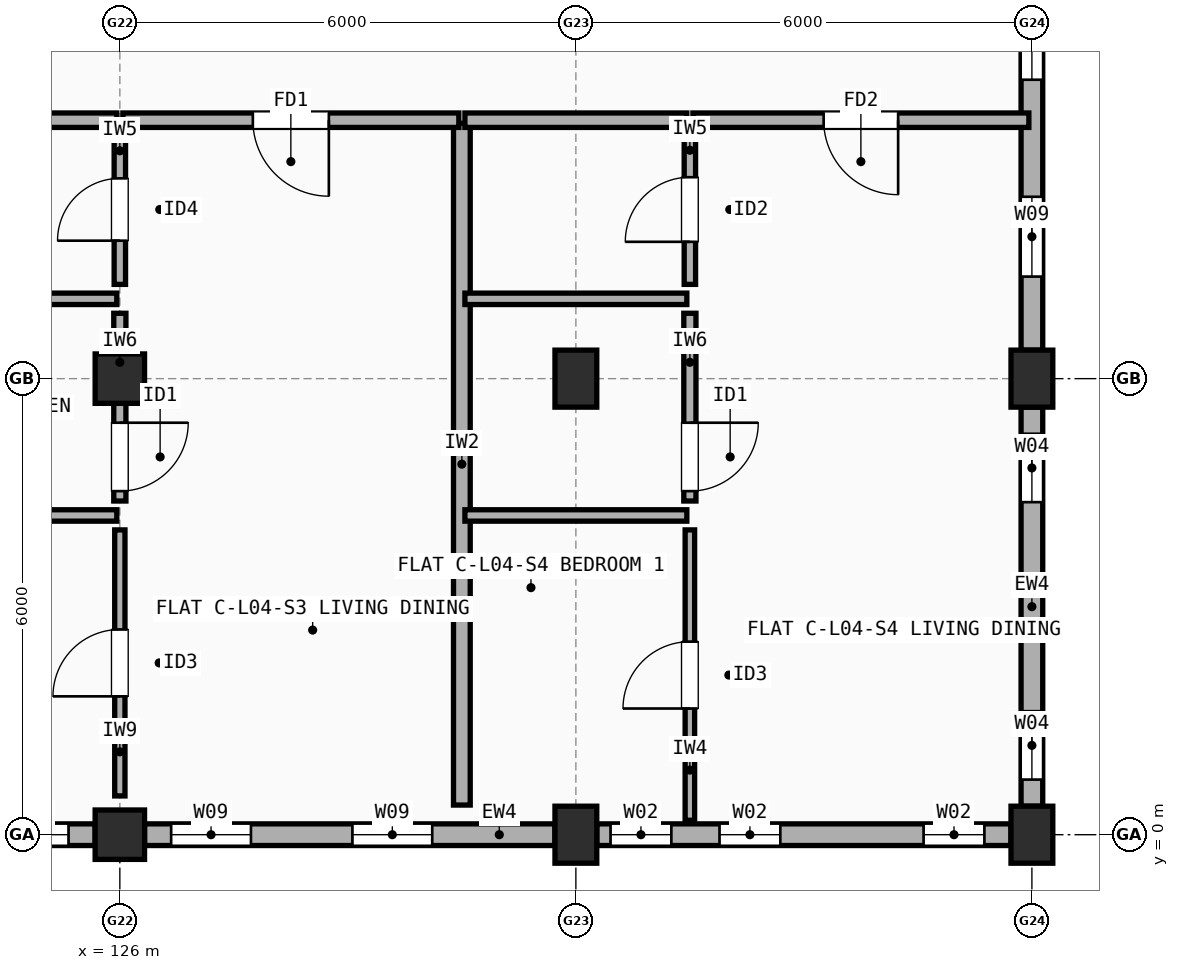
"""IFC4 building model, lengths in metres.
Left out: names, types, materials, properties, quantities, classifications, styles, units other than length and angle.
Written with IfcOpenShell. Run it as: python <this file> out.ifc"""

import sys

from ifc_helpers import new_model, si_unit, direction, frame, frame_2d, origin, origin_2d, place, context, subcontext, project, spatial, rectangle, extrude, element, fill, save


model = new_model("IFC4")
c1 = context("Model", 3, precision=1e-05, world=origin(), true_north=direction((0.0, 1.0)))
c2 = subcontext(c1, "Body", "Model", "MODEL_VIEW")
j1 = project(units=[si_unit("LENGTHUNIT", "METRE"), si_unit("PLANEANGLEUNIT", "RADIAN")], contexts=[c1])
p1 = place(None, origin())
s1 = spatial("IfcSite", under=j1, at=p1, CompositionType="ELEMENT")
p2 = place(p1, origin())
s2 = spatial("IfcBuilding", under=s1, at=p2, CompositionType="ELEMENT")
p3 = place(p2, frame((0.0, 0.0, 14.1)))
s3 = spatial("IfcBuildingStorey", under=s2, at=p3, CompositionType="ELEMENT", Elevation=14.1)
for number, where, z_axis, x_axis in (
    (1, (126.0, 0.0, 0.0), (0.0, 0.0, 1.0), (1.0, 0.0, 0.0)),
    (2, (126.0, 6.0, 0.0), (0.0, 0.0, 1.0), (1.0, 0.0, 0.0)),
):
    element("IfcColumn", number, at=place(p3, frame(where, z_axis=z_axis, x_axis=x_axis)), inside=s3, PredefinedType="COLUMN", context=c2, shape_type="SweptSolid", body=[
        extrude(rectangle(XDim=0.65, YDim=0.65, at=origin_2d()), origin(), (0.0, 0.0, 1.0), 2.95),
    ])
for number, where, z_axis, x_axis in (
    (3, (132.0, 0.0, 0.0), (0.0, 0.0, 1.0), (1.0, 0.0, 0.0)),
    (4, (132.0, 6.0, 0.0), (0.0, 0.0, 1.0), (1.0, 0.0, 0.0)),
    (5, (138.0, 0.0, 0.0), (0.0, 0.0, 1.0), (1.0, 0.0, 0.0)),
    (6, (138.0, 6.0, 0.0), (0.0, 0.0, 1.0), (1.0, 0.0, 0.0)),
):
    element("IfcColumn", number, at=place(p3, frame(where, z_axis=z_axis, x_axis=x_axis)), inside=s3, PredefinedType="COLUMN", context=c2, shape_type="SweptSolid", body=[
        extrude(rectangle(XDim=0.55, YDim=0.75, at=origin_2d()), origin(), (0.0, 0.0, 1.0), 2.95),
    ])
p4 = place(p3, frame((120.325, 0.0, 0.0), z_axis=(0.0, 0.0, 1.0), x_axis=(1.0, 0.0, 0.0)))
e7 = element("IfcWall", 7, at=p4, inside=s3, PredefinedType="STANDARD", context=c2, shape_type="SweptSolid", body=[
    extrude(rectangle(XDim=5.35, YDim=0.285, at=frame_2d((2.675, 0.0))), origin(), (0.0, 0.0, 1.0), 2.432),
])
p5 = place(p4, frame((1.565, 0.0, 0.9)))
e8 = element("IfcOpeningElement", 8, at=p5, cuts=e7, PredefinedType="OPENING", context=c2, shape_type="SweptSolid", body=[
    extrude(rectangle(XDim=0.9, YDim=1.3, at=frame_2d((0.45, 0.65))), frame((0.0, 0.152, 0.0), z_axis=(0.0, -1.0, 0.0), x_axis=(1.0, 0.0, 0.0)), (0.0, 0.0, 1.0), 0.305),
])
p6 = place(p4, frame((4.1, 0.0, 0.9)))
e9 = element("IfcOpeningElement", 9, at=p6, cuts=e7, PredefinedType="OPENING", context=c2, shape_type="SweptSolid", body=[
    extrude(rectangle(XDim=0.9, YDim=1.3, at=frame_2d((0.45, 0.65))), frame((0.0, 0.152, 0.0), z_axis=(0.0, -1.0, 0.0), x_axis=(1.0, 0.0, 0.0)), (0.0, 0.0, 1.0), 0.305),
])
p7 = place(p3, frame((126.325, 0.0, 0.0), z_axis=(0.0, 0.0, 1.0), x_axis=(1.0, 0.0, 0.0)))
e10 = element("IfcWall", 10, at=p7, inside=s3, PredefinedType="STANDARD", context=c2, shape_type="SweptSolid", body=[
    extrude(rectangle(XDim=5.4, YDim=0.285, at=frame_2d((2.7, 0.0))), origin(), (0.0, 0.0, 1.0), 2.432),
])
p8 = place(p7, frame((0.35, 0.0, 0.9)))
e11 = element("IfcOpeningElement", 11, at=p8, cuts=e10, PredefinedType="OPENING", context=c2, shape_type="SweptSolid", body=[
    extrude(rectangle(XDim=1.05, YDim=1.35, at=frame_2d((0.525, 0.675))), frame((0.0, 0.152, 0.0), z_axis=(0.0, -1.0, 0.0), x_axis=(1.0, 0.0, 0.0)), (0.0, 0.0, 1.0), 0.305),
])
p9 = place(p7, frame((2.735, 0.0, 0.9)))
e12 = element("IfcOpeningElement", 12, at=p9, cuts=e10, PredefinedType="OPENING", context=c2, shape_type="SweptSolid", body=[
    extrude(rectangle(XDim=1.05, YDim=1.35, at=frame_2d((0.525, 0.675))), frame((0.0, 0.152, 0.0), z_axis=(0.0, -1.0, 0.0), x_axis=(1.0, 0.0, 0.0)), (0.0, 0.0, 1.0), 0.305),
])
p10 = place(p3, frame((132.275, 0.0, 0.0), z_axis=(0.0, 0.0, 1.0), x_axis=(1.0, 0.0, 0.0)))
e13 = element("IfcWall", 13, at=p10, inside=s3, PredefinedType="STANDARD", context=c2, shape_type="SweptSolid", body=[
    extrude(rectangle(XDim=5.45, YDim=0.285, at=frame_2d((2.725, 0.0))), origin(), (0.0, 0.0, 1.0), 2.432),
])
p11 = place(p10, frame((1.615, 0.0, 0.9)))
e14 = element("IfcOpeningElement", 14, at=p11, cuts=e13, PredefinedType="OPENING", context=c2, shape_type="SweptSolid", body=[
    extrude(rectangle(XDim=0.8, YDim=1.2, at=frame_2d((0.4, 0.6))), frame((0.0, 0.152, 0.0), z_axis=(0.0, -1.0, 0.0), x_axis=(1.0, 0.0, 0.0)), (0.0, 0.0, 1.0), 0.305),
])
p12 = place(p10, frame((4.3, 0.0, 0.9)))
e15 = element("IfcOpeningElement", 15, at=p12, cuts=e13, PredefinedType="OPENING", context=c2, shape_type="SweptSolid", body=[
    extrude(rectangle(XDim=0.8, YDim=1.2, at=frame_2d((0.4, 0.6))), frame((0.0, 0.152, 0.0), z_axis=(0.0, -1.0, 0.0), x_axis=(1.0, 0.0, 0.0)), (0.0, 0.0, 1.0), 0.305),
])
p13 = place(p10, frame((0.181, 0.0, 0.9)))
e16 = element("IfcOpeningElement", 16, at=p13, cuts=e13, PredefinedType="OPENING", context=c2, shape_type="SweptSolid", body=[
    extrude(rectangle(XDim=0.8, YDim=1.2, at=frame_2d((0.4, 0.6))), frame((0.0, 0.152, 0.0), z_axis=(0.0, -1.0, 0.0), x_axis=(1.0, 0.0, 0.0)), (0.0, 0.0, 1.0), 0.305),
])
p14 = place(p3, frame((138.0, 0.375, 0.0), z_axis=(0.0, 0.0, 1.0), x_axis=(0.0, 1.0, 0.0)))
e17 = element("IfcWall", 17, at=p14, inside=s3, PredefinedType="STANDARD", context=c2, shape_type="SweptSolid", body=[
    extrude(rectangle(XDim=5.25, YDim=0.285, at=frame_2d((2.625, 0.0))), origin(), (0.0, 0.0, 1.0), 2.432),
])
p15 = place(p14, frame((0.35, 0.0, 0.9)))
e18 = element("IfcOpeningElement", 18, at=p15, cuts=e17, PredefinedType="OPENING", context=c2, shape_type="SweptSolid", body=[
    extrude(rectangle(XDim=0.9, YDim=1.3, at=frame_2d((0.45, 0.65))), frame((0.0, 0.152, 0.0), z_axis=(0.0, -1.0, 0.0), x_axis=(1.0, 0.0, 0.0)), (0.0, 0.0, 1.0), 0.305),
])
p16 = place(p14, frame((4.0, 0.0, 0.9)))
e19 = element("IfcOpeningElement", 19, at=p16, cuts=e17, PredefinedType="OPENING", context=c2, shape_type="SweptSolid", body=[
    extrude(rectangle(XDim=0.9, YDim=1.3, at=frame_2d((0.45, 0.65))), frame((0.0, 0.152, 0.0), z_axis=(0.0, -1.0, 0.0), x_axis=(1.0, 0.0, 0.0)), (0.0, 0.0, 1.0), 0.305),
])
p17 = place(p3, frame((138.0, 6.375, 0.0), z_axis=(0.0, 0.0, 1.0), x_axis=(0.0, 1.0, 0.0)))
e20 = element("IfcWall", 20, at=p17, inside=s3, PredefinedType="STANDARD", context=c2, shape_type="SweptSolid", body=[
    extrude(rectangle(XDim=5.25, YDim=0.285, at=frame_2d((2.625, 0.0))), origin(), (0.0, 0.0, 1.0), 2.432),
])
p18 = place(p17, frame((0.968, 0.0, 0.9)))
e21 = element("IfcOpeningElement", 21, at=p18, cuts=e20, PredefinedType="OPENING", context=c2, shape_type="SweptSolid", body=[
    extrude(rectangle(XDim=1.05, YDim=1.35, at=frame_2d((0.525, 0.675))), frame((0.0, 0.152, 0.0), z_axis=(0.0, -1.0, 0.0), x_axis=(1.0, 0.0, 0.0)), (0.0, 0.0, 1.0), 0.305),
])
p19 = place(p17, frame((3.558, 0.0, 0.9)))
e22 = element("IfcOpeningElement", 22, at=p19, cuts=e20, PredefinedType="OPENING", context=c2, shape_type="SweptSolid", body=[
    extrude(rectangle(XDim=1.2, YDim=1.35, at=frame_2d((0.6, 0.675))), frame((0.0, 0.152, 0.0), z_axis=(0.0, -1.0, 0.0), x_axis=(1.0, 0.0, 0.0)), (0.0, 0.0, 1.0), 0.305),
])
p20 = place(p3, frame((130.5, 0.39, 0.0), z_axis=(0.0, 0.0, 1.0), x_axis=(0.0, 1.0, 0.0)))
e23 = element("IfcWall", 23, at=p20, inside=s3, PredefinedType="SOLIDWALL", context=c2, shape_type="SweptSolid", body=[
    extrude(rectangle(XDim=8.97, YDim=0.22, at=frame_2d((4.485, 0.0))), origin(), (0.0, 0.0, 1.0), 2.432),
])
p21 = place(p3, frame((121.54, 9.4, 0.0), z_axis=(0.0, 0.0, 1.0), x_axis=(1.0, 0.0, 0.0)))
e24 = element("IfcWall", 24, at=p21, inside=s3, PredefinedType="SOLIDWALL", context=c2, shape_type="SweptSolid", body=[
    extrude(rectangle(XDim=4.42, YDim=0.19, at=frame_2d((2.21, 0.0))), origin(), (0.0, 0.0, 1.0), 2.548),
])
p22 = place(p3, frame((126.04, 9.4, 0.0), z_axis=(0.0, 0.0, 1.0), x_axis=(1.0, 0.0, 0.0)))
e25 = element("IfcWall", 25, at=p22, inside=s3, PredefinedType="SOLIDWALL", context=c2, shape_type="SweptSolid", body=[
    extrude(rectangle(XDim=4.42, YDim=0.19, at=frame_2d((2.21, 0.0))), origin(), (0.0, 0.0, 1.0), 2.548),
])
p23 = place(p22, frame((1.71, 0.0, 0.0)))
e26 = element("IfcOpeningElement", 26, at=p23, cuts=e25, PredefinedType="OPENING", context=c2, shape_type="SweptSolid", body=[
    extrude(rectangle(XDim=1.0, YDim=2.15, at=frame_2d((0.5, 1.075))), frame((0.0, 0.105, 0.0), z_axis=(0.0, -1.0, 0.0), x_axis=(1.0, 0.0, 0.0)), (0.0, 0.0, 1.0), 0.21),
])
p24 = place(p3, frame((126.0, 0.51, 0.0), z_axis=(0.0, 0.0, 1.0), x_axis=(0.0, 1.0, 0.0)))
e27 = element("IfcWall", 27, at=p24, inside=s3, PredefinedType="PARTITIONING", context=c2, shape_type="SweptSolid", body=[
    extrude(rectangle(XDim=3.5, YDim=0.135, at=frame_2d((1.75, 0.0))), origin(), (0.0, 0.0, 1.0), 2.458),
])
p25 = place(p24, frame((1.31, 0.0, 0.0)))
e28 = element("IfcOpeningElement", 28, at=p25, cuts=e27, PredefinedType="OPENING", context=c2, shape_type="SweptSolid", body=[
    extrude(rectangle(XDim=0.88, YDim=2.1, at=frame_2d((0.44, 1.05))), frame((0.0, 0.077, 0.0), z_axis=(0.0, -1.0, 0.0), x_axis=(1.0, 0.0, 0.0)), (0.0, 0.0, 1.0), 0.155),
])
p26 = place(p3, frame((126.0, 4.39, 0.0), z_axis=(0.0, 0.0, 1.0), x_axis=(0.0, 1.0, 0.0)))
e29 = element("IfcWall", 29, at=p26, inside=s3, PredefinedType="PLUMBINGWALL", context=c2, shape_type="SweptSolid", body=[
    extrude(rectangle(XDim=2.47, YDim=0.16, at=frame_2d((1.235, 0.0))), origin(), (0.0, 0.0, 1.0), 2.458),
])
p27 = place(p26, frame((0.13, 0.0, 0.0)))
e30 = element("IfcOpeningElement", 30, at=p27, cuts=e29, PredefinedType="OPENING", context=c2, shape_type="SweptSolid", body=[
    extrude(rectangle(XDim=0.9, YDim=2.1, at=frame_2d((0.45, 1.05))), frame((0.0, 0.09, 0.0), z_axis=(0.0, -1.0, 0.0), x_axis=(1.0, 0.0, 0.0)), (0.0, 0.0, 1.0), 0.18),
])
p28 = place(p3, frame((126.0, 7.24, 0.0), z_axis=(0.0, 0.0, 1.0), x_axis=(0.0, 1.0, 0.0)))
e31 = element("IfcWall", 31, at=p28, inside=s3, PredefinedType="PARTITIONING", context=c2, shape_type="SweptSolid", body=[
    extrude(rectangle(XDim=1.97, YDim=0.15, at=frame_2d((0.985, 0.0))), origin(), (0.0, 0.0, 1.0), 2.548),
])
p29 = place(p28, frame((0.575, 0.0, 0.0)))
e32 = element("IfcOpeningElement", 32, at=p29, cuts=e31, PredefinedType="OPENING", context=c2, shape_type="SweptSolid", body=[
    extrude(rectangle(XDim=0.82, YDim=2.08, at=frame_2d((0.41, 1.04))), frame((0.0, 0.085, 0.0), z_axis=(0.0, -1.0, 0.0), x_axis=(1.0, 0.0, 0.0)), (0.0, 0.0, 1.0), 0.17),
])
p30 = place(p3, frame((121.54, 4.2, 0.0), z_axis=(0.0, 0.0, 1.0), x_axis=(1.0, 0.0, 0.0)))
e33 = element("IfcWall", 33, at=p30, inside=s3, PredefinedType="PARTITIONING", context=c2, shape_type="SweptSolid", body=[
    extrude(rectangle(XDim=4.42, YDim=0.15, at=frame_2d((2.21, 0.0))), origin(), (0.0, 0.0, 1.0), 2.458),
])
p31 = place(p3, frame((121.54, 7.05, 0.0), z_axis=(0.0, 0.0, 1.0), x_axis=(1.0, 0.0, 0.0)))
e34 = element("IfcWall", 34, at=p31, inside=s3, PredefinedType="PARTITIONING", context=c2, shape_type="SweptSolid", body=[
    extrude(rectangle(XDim=4.42, YDim=0.15, at=frame_2d((2.21, 0.0))), origin(), (0.0, 0.0, 1.0), 2.548),
])
p32 = place(p3, frame((130.54, 9.4, 0.0), z_axis=(0.0, 0.0, 1.0), x_axis=(1.0, 0.0, 0.0)))
e35 = element("IfcWall", 35, at=p32, inside=s3, PredefinedType="SOLIDWALL", context=c2, shape_type="SweptSolid", body=[
    extrude(rectangle(XDim=2.92, YDim=0.19, at=frame_2d((1.46, 0.0))), origin(), (0.0, 0.0, 1.0), 2.432),
])
p33 = place(p3, frame((133.54, 9.4, 0.0), z_axis=(0.0, 0.0, 1.0), x_axis=(1.0, 0.0, 0.0)))
e36 = element("IfcWall", 36, at=p33, inside=s3, PredefinedType="SOLIDWALL", context=c2, shape_type="SweptSolid", body=[
    extrude(rectangle(XDim=4.42, YDim=0.19, at=frame_2d((2.21, 0.0))), origin(), (0.0, 0.0, 1.0), 2.432),
])
p34 = place(p33, frame((1.72, 0.0, 0.0)))
e37 = element("IfcOpeningElement", 37, at=p34, cuts=e36, PredefinedType="OPENING", context=c2, shape_type="SweptSolid", body=[
    extrude(rectangle(XDim=0.98, YDim=2.15, at=frame_2d((0.49, 1.075))), frame((0.0, 0.105, 0.0), z_axis=(0.0, -1.0, 0.0), x_axis=(1.0, 0.0, 0.0)), (0.0, 0.0, 1.0), 0.21),
])
p35 = place(p3, frame((133.5, 0.19, 0.0), z_axis=(0.0, 0.0, 1.0), x_axis=(0.0, 1.0, 0.0)))
e38 = element("IfcWall", 38, at=p35, inside=s3, PredefinedType="PARTITIONING", context=c2, shape_type="SweptSolid", body=[
    extrude(rectangle(XDim=3.82, YDim=0.125, at=frame_2d((1.91, 0.0))), origin(), (0.0, 0.0, 1.0), 2.95),
])
p36 = place(p35, frame((1.47, 0.0, 0.0)))
e39 = element("IfcOpeningElement", 39, at=p36, cuts=e38, PredefinedType="OPENING", context=c2, shape_type="SweptSolid", body=[
    extrude(rectangle(XDim=0.88, YDim=2.1, at=frame_2d((0.44, 1.05))), frame((0.0, 0.073, 0.0), z_axis=(0.0, -1.0, 0.0), x_axis=(1.0, 0.0, 0.0)), (0.0, 0.0, 1.0), 0.145),
])
p37 = place(p3, frame((133.5, 4.39, 0.0), z_axis=(0.0, 0.0, 1.0), x_axis=(0.0, 1.0, 0.0)))
e40 = element("IfcWall", 40, at=p37, inside=s3, PredefinedType="PLUMBINGWALL", context=c2, shape_type="SweptSolid", body=[
    extrude(rectangle(XDim=2.47, YDim=0.16, at=frame_2d((1.235, 0.0))), origin(), (0.0, 0.0, 1.0), 2.432),
])
p38 = place(p37, frame((0.13, 0.0, 0.0)))
e41 = element("IfcOpeningElement", 41, at=p38, cuts=e40, PredefinedType="OPENING", context=c2, shape_type="SweptSolid", body=[
    extrude(rectangle(XDim=0.9, YDim=2.1, at=frame_2d((0.45, 1.05))), frame((0.0, 0.09, 0.0), z_axis=(0.0, -1.0, 0.0), x_axis=(1.0, 0.0, 0.0)), (0.0, 0.0, 1.0), 0.18),
])
p39 = place(p3, frame((133.5, 7.24, 0.0), z_axis=(0.0, 0.0, 1.0), x_axis=(0.0, 1.0, 0.0)))
e42 = element("IfcWall", 42, at=p39, inside=s3, PredefinedType="PARTITIONING", context=c2, shape_type="SweptSolid", body=[
    extrude(rectangle(XDim=1.97, YDim=0.15, at=frame_2d((0.985, 0.0))), origin(), (0.0, 0.0, 1.0), 2.95),
])
p40 = place(p39, frame((0.56, 0.0, 0.0)))
e43 = element("IfcOpeningElement", 43, at=p40, cuts=e42, PredefinedType="OPENING", context=c2, shape_type="SweptSolid", body=[
    extrude(rectangle(XDim=0.85, YDim=2.1, at=frame_2d((0.425, 1.05))), frame((0.0, 0.085, 0.0), z_axis=(0.0, -1.0, 0.0), x_axis=(1.0, 0.0, 0.0)), (0.0, 0.0, 1.0), 0.17),
])
for number, where, z_axis, x_axis in (
    (44, (130.54, 4.2, 0.0), (0.0, 0.0, 1.0), (1.0, 0.0, 0.0)),
    (45, (130.54, 7.05, 0.0), (0.0, 0.0, 1.0), (1.0, 0.0, 0.0)),
):
    element("IfcWall", number, at=place(p3, frame(where, z_axis=z_axis, x_axis=x_axis)), inside=s3, PredefinedType="PARTITIONING", context=c2, shape_type="SweptSolid", body=[
        extrude(rectangle(XDim=2.92, YDim=0.15, at=frame_2d((1.46, 0.0))), origin(), (0.0, 0.0, 1.0), 2.432),
    ])
p41 = place(p6, origin())
e46 = element("IfcWindow", 46, at=p41, inside=s3, PartitioningType="SINGLE_PANEL", PredefinedType="WINDOW", context=c2, shape_type="SweptSolid", body=[
    extrude(rectangle(XDim=0.9, YDim=1.3, at=frame_2d((0.45, 0.65))), frame((0.0, 0.03, 0.0), z_axis=(0.0, -1.0, 0.0), x_axis=(1.0, 0.0, 0.0)), (0.0, 0.0, 1.0), 0.06),
])
fill(e9, e46)
p42 = place(p8, origin())
e47 = element("IfcWindow", 47, at=p42, inside=s3, PartitioningType="SINGLE_PANEL", PredefinedType="WINDOW", context=c2, shape_type="SweptSolid", body=[
    extrude(rectangle(XDim=1.05, YDim=1.35, at=frame_2d((0.525, 0.675))), frame((0.0, 0.03, 0.0), z_axis=(0.0, -1.0, 0.0), x_axis=(1.0, 0.0, 0.0)), (0.0, 0.0, 1.0), 0.06),
])
fill(e11, e47)
p43 = place(p9, origin())
e48 = element("IfcWindow", 48, at=p43, inside=s3, PartitioningType="SINGLE_PANEL", PredefinedType="WINDOW", context=c2, shape_type="SweptSolid", body=[
    extrude(rectangle(XDim=1.05, YDim=1.35, at=frame_2d((0.525, 0.675))), frame((0.0, 0.03, 0.0), z_axis=(0.0, -1.0, 0.0), x_axis=(1.0, 0.0, 0.0)), (0.0, 0.0, 1.0), 0.06),
])
fill(e12, e48)
p44 = place(p11, origin())
e49 = element("IfcWindow", 49, at=p44, inside=s3, PartitioningType="SINGLE_PANEL", PredefinedType="WINDOW", context=c2, shape_type="SweptSolid", body=[
    extrude(rectangle(XDim=0.8, YDim=1.2, at=frame_2d((0.4, 0.6))), frame((0.0, 0.03, 0.0), z_axis=(0.0, -1.0, 0.0), x_axis=(1.0, 0.0, 0.0)), (0.0, 0.0, 1.0), 0.06),
])
fill(e14, e49)
p45 = place(p12, origin())
e50 = element("IfcWindow", 50, at=p45, inside=s3, PartitioningType="SINGLE_PANEL", PredefinedType="WINDOW", context=c2, shape_type="SweptSolid", body=[
    extrude(rectangle(XDim=0.8, YDim=1.2, at=frame_2d((0.4, 0.6))), frame((0.0, 0.03, 0.0), z_axis=(0.0, -1.0, 0.0), x_axis=(1.0, 0.0, 0.0)), (0.0, 0.0, 1.0), 0.06),
])
fill(e15, e50)
p46 = place(p15, origin())
e51 = element("IfcWindow", 51, at=p46, inside=s3, PartitioningType="SINGLE_PANEL", PredefinedType="WINDOW", context=c2, shape_type="SweptSolid", body=[
    extrude(rectangle(XDim=0.9, YDim=1.3, at=frame_2d((0.45, 0.65))), frame((0.0, 0.03, 0.0), z_axis=(0.0, -1.0, 0.0), x_axis=(1.0, 0.0, 0.0)), (0.0, 0.0, 1.0), 0.06),
])
fill(e18, e51)
p47 = place(p16, origin())
e52 = element("IfcWindow", 52, at=p47, inside=s3, PartitioningType="SINGLE_PANEL", PredefinedType="WINDOW", context=c2, shape_type="SweptSolid", body=[
    extrude(rectangle(XDim=0.9, YDim=1.3, at=frame_2d((0.45, 0.65))), frame((0.0, 0.03, 0.0), z_axis=(0.0, -1.0, 0.0), x_axis=(1.0, 0.0, 0.0)), (0.0, 0.0, 1.0), 0.06),
])
fill(e19, e52)
p48 = place(p18, origin())
e53 = element("IfcWindow", 53, at=p48, inside=s3, PartitioningType="SINGLE_PANEL", PredefinedType="WINDOW", context=c2, shape_type="SweptSolid", body=[
    extrude(rectangle(XDim=1.05, YDim=1.35, at=frame_2d((0.525, 0.675))), frame((0.0, 0.03, 0.0), z_axis=(0.0, -1.0, 0.0), x_axis=(1.0, 0.0, 0.0)), (0.0, 0.0, 1.0), 0.06),
])
fill(e21, e53)
p49 = place(p19, origin())
e54 = element("IfcWindow", 54, at=p49, inside=s3, PartitioningType="SINGLE_PANEL", PredefinedType="WINDOW", context=c2, shape_type="SweptSolid", body=[
    extrude(rectangle(XDim=1.2, YDim=1.35, at=frame_2d((0.6, 0.675))), frame((0.0, 0.03, 0.0), z_axis=(0.0, -1.0, 0.0), x_axis=(1.0, 0.0, 0.0)), (0.0, 0.0, 1.0), 0.06),
])
fill(e22, e54)
p50 = place(p13, origin())
e55 = element("IfcWindow", 55, at=p50, inside=s3, PartitioningType="SINGLE_PANEL", PredefinedType="WINDOW", context=c2, shape_type="SweptSolid", body=[
    extrude(rectangle(XDim=0.8, YDim=1.2, at=frame_2d((0.4, 0.6))), frame((0.0, 0.03, 0.0), z_axis=(0.0, -1.0, 0.0), x_axis=(1.0, 0.0, 0.0)), (0.0, 0.0, 1.0), 0.06),
])
fill(e16, e55)
p51 = place(p23, origin())
e56 = element("IfcDoor", 56, at=p51, inside=s3, OperationType="SINGLE_SWING_RIGHT", PredefinedType="DOOR", context=c2, shape_type="SweptSolid", body=[
    extrude(rectangle(XDim=1.0, YDim=2.15, at=frame_2d((0.5, 1.075))), frame((0.0, 0.025, 0.0), z_axis=(0.0, -1.0, 0.0), x_axis=(1.0, 0.0, 0.0)), (0.0, 0.0, 1.0), 0.05),
])
fill(e26, e56)
p52 = place(p25, origin())
e57 = element("IfcDoor", 57, at=p52, inside=s3, OperationType="SINGLE_SWING_LEFT", PredefinedType="DOOR", context=c2, shape_type="SweptSolid", body=[
    extrude(rectangle(XDim=0.88, YDim=2.1, at=frame_2d((0.44, 1.05))), frame((0.0, 0.025, 0.0), z_axis=(0.0, -1.0, 0.0), x_axis=(1.0, 0.0, 0.0)), (0.0, 0.0, 1.0), 0.05),
])
fill(e28, e57)
p53 = place(p27, origin())
e58 = element("IfcDoor", 58, at=p53, inside=s3, OperationType="SINGLE_SWING_RIGHT", PredefinedType="DOOR", context=c2, shape_type="SweptSolid", body=[
    extrude(rectangle(XDim=0.9, YDim=2.1, at=frame_2d((0.45, 1.05))), frame((0.0, 0.025, 0.0), z_axis=(0.0, -1.0, 0.0), x_axis=(1.0, 0.0, 0.0)), (0.0, 0.0, 1.0), 0.05),
])
fill(e30, e58)
p54 = place(p29, origin())
e59 = element("IfcDoor", 59, at=p54, inside=s3, OperationType="SINGLE_SWING_LEFT", PredefinedType="DOOR", context=c2, shape_type="SweptSolid", body=[
    extrude(rectangle(XDim=0.82, YDim=2.08, at=frame_2d((0.41, 1.04))), frame((0.0, 0.025, 0.0), z_axis=(0.0, -1.0, 0.0), x_axis=(1.0, 0.0, 0.0)), (0.0, 0.0, 1.0), 0.05),
])
fill(e32, e59)
p55 = place(p34, origin())
e60 = element("IfcDoor", 60, at=p55, inside=s3, OperationType="SINGLE_SWING_RIGHT", PredefinedType="DOOR", context=c2, shape_type="SweptSolid", body=[
    extrude(rectangle(XDim=0.98, YDim=2.15, at=frame_2d((0.49, 1.075))), frame((0.0, 0.025, 0.0), z_axis=(0.0, -1.0, 0.0), x_axis=(1.0, 0.0, 0.0)), (0.0, 0.0, 1.0), 0.05),
])
fill(e37, e60)
p56 = place(p36, origin())
e61 = element("IfcDoor", 61, at=p56, inside=s3, OperationType="SINGLE_SWING_LEFT", PredefinedType="DOOR", context=c2, shape_type="SweptSolid", body=[
    extrude(rectangle(XDim=0.88, YDim=2.1, at=frame_2d((0.44, 1.05))), frame((0.0, 0.025, 0.0), z_axis=(0.0, -1.0, 0.0), x_axis=(1.0, 0.0, 0.0)), (0.0, 0.0, 1.0), 0.05),
])
fill(e39, e61)
p57 = place(p38, origin())
e62 = element("IfcDoor", 62, at=p57, inside=s3, OperationType="SINGLE_SWING_RIGHT", PredefinedType="DOOR", context=c2, shape_type="SweptSolid", body=[
    extrude(rectangle(XDim=0.9, YDim=2.1, at=frame_2d((0.45, 1.05))), frame((0.0, 0.025, 0.0), z_axis=(0.0, -1.0, 0.0), x_axis=(1.0, 0.0, 0.0)), (0.0, 0.0, 1.0), 0.05),
])
fill(e41, e62)
p58 = place(p40, origin())
e63 = element("IfcDoor", 63, at=p58, inside=s3, OperationType="SINGLE_SWING_LEFT", PredefinedType="DOOR", context=c2, shape_type="SweptSolid", body=[
    extrude(rectangle(XDim=0.85, YDim=2.1, at=frame_2d((0.425, 1.05))), frame((0.0, 0.025, 0.0), z_axis=(0.0, -1.0, 0.0), x_axis=(1.0, 0.0, 0.0)), (0.0, 0.0, 1.0), 0.05),
])
fill(e43, e63)
save(model, sys.argv[1])
